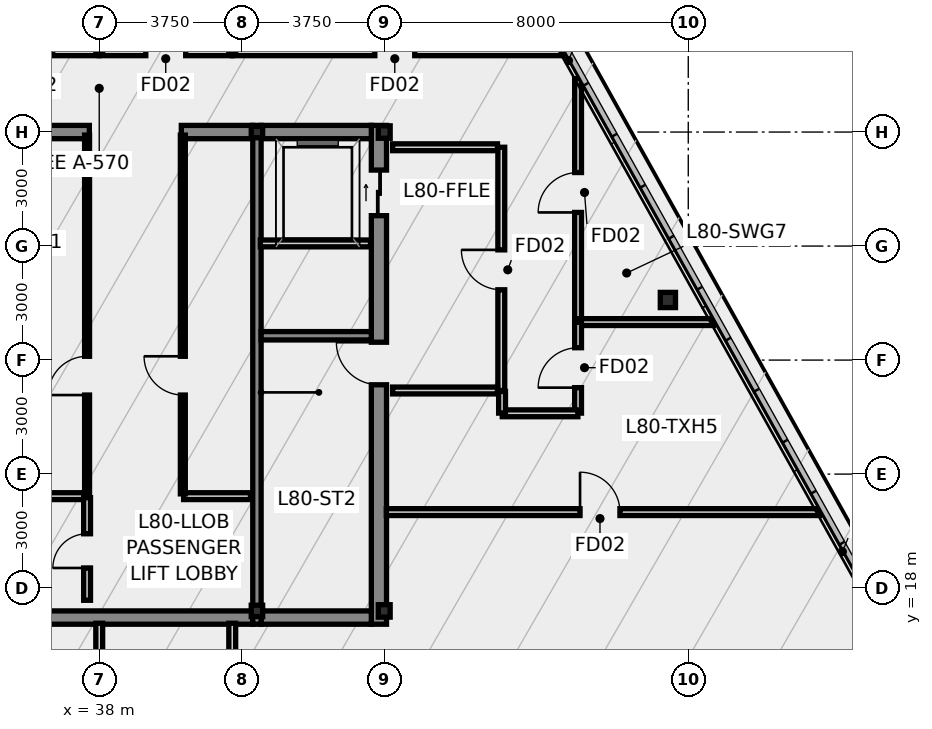
"""IFC4 building model, lengths in metres.
Left out: names, types, materials, properties, quantities, classifications, styles, units other than length and angle.
Written with IfcOpenShell. Run it as: python <this file> out.ifc"""

import sys

from ifc_helpers import new_model, si_unit, direction, frame, frame_2d, origin, origin_2d, place, context, subcontext, project, spatial, rectangle, hollow_rectangle, i_section, extrude, source, transform, mapped, element, fill, save


model = new_model("IFC4")
c1 = context("Model", 3, precision=1e-05, world=origin(), true_north=direction((0.0, 1.0)))
c2 = subcontext(c1, "Body", "Model", "MODEL_VIEW")
j1 = project(units=[si_unit("LENGTHUNIT", "METRE"), si_unit("PLANEANGLEUNIT", "RADIAN")], contexts=[c1])
p1 = place(None, origin())
s1 = spatial("IfcSite", under=j1, at=p1, CompositionType="ELEMENT")
p2 = place(p1, origin())
s2 = spatial("IfcBuilding", under=s1, at=p2, CompositionType="ELEMENT")
p3 = place(p2, frame((0.0, 0.0, 303.4)))
s3 = spatial("IfcBuildingStorey", under=s2, at=p3, CompositionType="ELEMENT", Elevation=303.4)
m1 = source(origin(), c2, "Body", "SweptSolid", [
    extrude(i_section(OverallWidth=0.311, OverallDepth=0.327, WebThickness=0.016, FlangeThickness=0.025, at=origin_2d()), origin(), (0.0, 0.0, 1.0), 8.567),
])
p4 = place(p3, frame((45.5, 17.4, 0.0), z_axis=(0.0, 0.0, 1.0), x_axis=(1.0, 0.0, 0.0)))
e1 = element("IfcColumn", 1, at=p4, inside=s3, PredefinedType="COLUMN", context=c2, shape_type="MappedRepresentation", body=[
    mapped(m1, transform((0.0, 0.0, 0.0), scale=1.0)),
])
m2 = source(origin(), c2, "Body", "SweptSolid", [
    extrude(i_section(OverallWidth=0.311, OverallDepth=0.327, WebThickness=0.016, FlangeThickness=0.025, at=origin_2d()), origin(), (0.0, 0.0, 1.0), 10.913),
])
p5 = place(p3, frame((45.5, 30.0, 0.0), z_axis=(0.0, 0.0, 1.0), x_axis=(1.0, 0.0, 0.0)))
e2 = element("IfcColumn", 2, at=p5, inside=s3, PredefinedType="COLUMN", context=c2, shape_type="MappedRepresentation", body=[
    mapped(m2, transform((0.0, 0.0, 0.0), scale=1.0)),
])
m3 = source(origin(), c2, "Body", "SweptSolid", [
    extrude(hollow_rectangle(XDim=0.3, YDim=0.3, WallThickness=0.012, at=origin_2d()), origin(), (0.0, 0.0, 1.0), 8.207),
])
p6 = place(p3, frame((42.15, 17.4, 0.0), z_axis=(0.0, 0.0, 1.0), x_axis=(1.0, 0.0, 0.0)))
e3 = element("IfcColumn", 3, at=p6, inside=s3, PredefinedType="COLUMN", context=c2, shape_type="MappedRepresentation", body=[
    mapped(m3, transform((0.0, 0.0, 0.0), scale=1.0)),
])
m4 = source(origin(), c2, "Body", "SweptSolid", [
    extrude(hollow_rectangle(XDim=0.3, YDim=0.3, WallThickness=0.012, at=origin_2d()), origin(), (0.0, 0.0, 1.0), 10.553),
])
p7 = place(p3, frame((42.15, 30.0, 0.0), z_axis=(0.0, 0.0, 1.0), x_axis=(1.0, 0.0, 0.0)))
e4 = element("IfcColumn", 4, at=p7, inside=s3, PredefinedType="COLUMN", context=c2, shape_type="MappedRepresentation", body=[
    mapped(m4, transform((0.0, 0.0, 0.0), scale=1.0)),
])
p8 = place(p3, frame((45.36, 17.05, 0.0), z_axis=(0.0, 0.0, 1.0), x_axis=(0.0, 1.0, 0.0)))
e5 = element("IfcWall", 5, at=p8, inside=s3, PredefinedType="SHEAR", context=c2, shape_type="SweptSolid", body=[
    extrude(rectangle(XDim=13.125, YDim=0.4, at=frame_2d((6.562, 0.0))), origin(), (0.0, 0.0, 1.0), 6.87),
])
p9 = place(p8, frame((6.3, 0.0, 0.0)))
e6 = element("IfcOpeningElement", 6, at=p9, cuts=e5, PredefinedType="OPENING", context=c2, shape_type="SweptSolid", body=[
    extrude(rectangle(XDim=1.12, YDim=2.15, at=frame_2d((0.56, 1.075))), frame((0.0, 0.212, 0.0), z_axis=(0.0, -1.0, 0.0), x_axis=(1.0, 0.0, 0.0)), (0.0, 0.0, 1.0), 0.424),
])
p10 = place(p8, frame((10.75, 0.0, 0.0)))
e7 = element("IfcOpeningElement", 7, at=p10, cuts=e5, PredefinedType="OPENING", context=c2, shape_type="SweptSolid", body=[
    extrude(rectangle(XDim=1.2, YDim=2.2, at=frame_2d((0.6, 1.1))), frame((0.0, 0.212, 0.0), z_axis=(0.0, -1.0, 0.0), x_axis=(1.0, 0.0, 0.0)), (0.0, 0.0, 1.0), 0.424),
])
p11 = place(p3, frame((33.96, 17.225, 0.0), z_axis=(0.0, 0.0, 1.0), x_axis=(1.0, 0.0, 0.0)))
e8 = element("IfcWall", 8, at=p11, inside=s3, PredefinedType="SHEAR", context=c2, shape_type="SweptSolid", body=[
    extrude(rectangle(XDim=8.08, YDim=0.35, at=frame_2d((4.04, 0.0))), origin(), (0.0, 0.0, 1.0), 6.87),
])
p12 = place(p3, frame((42.26, 17.225, 0.0), z_axis=(0.0, 0.0, 1.0), x_axis=(1.0, 0.0, 0.0)))
e9 = element("IfcWall", 9, at=p12, inside=s3, PredefinedType="SHEAR", context=c2, shape_type="SweptSolid", body=[
    extrude(rectangle(XDim=2.9, YDim=0.35, at=frame_2d((1.45, 0.0))), origin(), (0.0, 0.0, 1.0), 6.87),
])
p13 = place(p3, frame((33.96, 30.0, 0.0), z_axis=(0.0, 0.0, 1.0), x_axis=(1.0, 0.0, 0.0)))
e10 = element("IfcWall", 10, at=p13, inside=s3, PredefinedType="SHEAR", context=c2, shape_type="SweptSolid", body=[
    extrude(rectangle(XDim=3.78, YDim=0.35, at=frame_2d((1.89, 0.0))), origin(), (0.0, 0.0, 1.0), 6.87),
])
p14 = place(p3, frame((40.16, 30.0, 0.0), z_axis=(0.0, 0.0, 1.0), x_axis=(1.0, 0.0, 0.0)))
e11 = element("IfcWall", 11, at=p14, inside=s3, PredefinedType="SHEAR", context=c2, shape_type="SweptSolid", body=[
    extrude(rectangle(XDim=1.88, YDim=0.35, at=frame_2d((0.94, 0.0))), origin(), (0.0, 0.0, 1.0), 6.87),
])
p15 = place(p3, frame((42.26, 30.0, 0.0), z_axis=(0.0, 0.0, 1.0), x_axis=(1.0, 0.0, 0.0)))
e12 = element("IfcWall", 12, at=p15, inside=s3, PredefinedType="SHEAR", context=c2, shape_type="SweptSolid", body=[
    extrude(rectangle(XDim=2.9, YDim=0.35, at=frame_2d((1.45, 0.0))), origin(), (0.0, 0.0, 1.0), 6.87),
])
p16 = place(p3, frame((42.15, 17.05, 0.0), z_axis=(0.0, 0.0, 1.0), x_axis=(0.0, 1.0, 0.0)))
e13 = element("IfcWall", 13, at=p16, inside=s3, PredefinedType="SHEAR", context=c2, shape_type="SweptSolid", body=[
    extrude(rectangle(XDim=13.125, YDim=0.22, at=frame_2d((6.562, 0.0))), origin(), (0.0, 0.0, 1.0), 6.87),
])
p17 = place(p3, frame((42.26, 24.64, 0.0), z_axis=(0.0, 0.0, 1.0), x_axis=(1.0, 0.0, 0.0)))
e14 = element("IfcWall", 14, at=p17, inside=s3, PredefinedType="SHEAR", context=c2, shape_type="SweptSolid", body=[
    extrude(rectangle(XDim=2.9, YDim=0.22, at=frame_2d((1.45, 0.0))), origin(), (0.0, 0.0, 1.0), 6.87),
])
m5 = source(origin(), c2, "Body", "SweptSolid", [
    extrude(hollow_rectangle(XDim=0.4, YDim=0.4, WallThickness=0.016, at=origin_2d()), origin(), (0.0, 0.0, 1.0), 10.893),
])
p18 = place(p3, frame((52.964, 25.581, 0.0), z_axis=(0.0, 0.0, 1.0), x_axis=(1.0, 0.0, 0.0)))
e15 = element("IfcColumn", 15, at=p18, inside=s3, PredefinedType="COLUMN", context=c2, shape_type="MappedRepresentation", body=[
    mapped(m5, transform((0.0, 0.0, 0.0), scale=1.0)),
])
p19 = place(p3, frame((48.58, 23.2, 0.0), z_axis=(0.0, 0.0, 1.0), x_axis=(0.0, 1.0, 0.0)))
e16 = element("IfcWall", 16, at=p19, inside=s3, PredefinedType="PARTITIONING", context=c2, shape_type="SweptSolid", body=[
    extrude(rectangle(XDim=6.4, YDim=0.18, at=frame_2d((3.2, 0.0))), origin(), (0.0, 0.0, 1.0), 3.15),
])
p20 = place(p19, frame((2.65, 0.0, 0.0)))
e17 = element("IfcOpeningElement", 17, at=p20, cuts=e16, PredefinedType="OPENING", context=c2, shape_type="SweptSolid", body=[
    extrude(rectangle(XDim=1.05, YDim=2.15, at=frame_2d((0.525, 1.075))), frame((0.0, 0.102, 0.0), z_axis=(0.0, -1.0, 0.0), x_axis=(1.0, 0.0, 0.0)), (0.0, 0.0, 1.0), 0.204),
])
for number, where, z_axis, x_axis in (
    (18, (45.72, 23.2, 0.0), (0.0, 0.0, 1.0), (1.0, 0.0, 0.0)),
    (19, (45.72, 29.6, 0.0), (0.0, 0.0, 1.0), (1.0, 0.0, 0.0)),
):
    element("IfcWall", number, at=place(p3, frame(where, z_axis=z_axis, x_axis=x_axis)), inside=s3, PredefinedType="PARTITIONING", context=c2, shape_type="SweptSolid", body=[
        extrude(rectangle(XDim=2.76, YDim=0.18, at=frame_2d((1.38, 0.0))), origin(), (0.0, 0.0, 1.0), 3.15),
    ])
p21 = place(p3, frame((42.24, 27.07, 0.0), z_axis=(0.0, 0.0, 1.0), x_axis=(1.0, 0.0, 0.0)))
e20 = element("IfcWall", 20, at=p21, inside=s3, PredefinedType="PARTITIONING", context=c2, shape_type="SweptSolid", body=[
    extrude(rectangle(XDim=2.9, YDim=0.18, at=frame_2d((1.45, 0.0))), origin(), (0.0, 0.0, 1.0), 3.15),
])
p22 = place(p3, frame((34.02, 20.42, 0.0), z_axis=(0.0, 0.0, 1.0), x_axis=(1.0, 0.0, 0.0)))
e21 = element("IfcWall", 21, at=p22, inside=s3, PredefinedType="PARTITIONING", context=c2, shape_type="SweptSolid", body=[
    extrude(rectangle(XDim=3.64, YDim=0.18, at=frame_2d((1.82, 0.0))), origin(), (0.0, 0.0, 1.0), 3.15),
])
p23 = place(p3, frame((40.22, 20.42, 0.0), z_axis=(0.0, 0.0, 1.0), x_axis=(1.0, 0.0, 0.0)))
e22 = element("IfcWall", 22, at=p23, inside=s3, PredefinedType="PARTITIONING", context=c2, shape_type="SweptSolid", body=[
    extrude(rectangle(XDim=1.76, YDim=0.18, at=frame_2d((0.88, 0.0))), origin(), (0.0, 0.0, 1.0), 3.15),
])
p24 = place(p3, frame((37.68, 20.48, 0.0), z_axis=(0.0, 0.0, 1.0), x_axis=(0.0, 1.0, 0.0)))
e23 = element("IfcWall", 23, at=p24, inside=s3, PredefinedType="PARTITIONING", context=c2, shape_type="SweptSolid", body=[
    extrude(rectangle(XDim=9.44, YDim=0.13, at=frame_2d((4.72, 0.0))), origin(), (0.0, 0.0, 1.0), 3.15),
])
p25 = place(p24, frame((2.6, 0.0, 0.0)))
e24 = element("IfcOpeningElement", 24, at=p25, cuts=e23, PredefinedType="OPENING", context=c2, shape_type="SweptSolid", body=[
    extrude(rectangle(XDim=1.02, YDim=2.15, at=frame_2d((0.51, 1.075))), frame((0.0, 0.077, 0.0), z_axis=(0.0, -1.0, 0.0), x_axis=(1.0, 0.0, 0.0)), (0.0, 0.0, 1.0), 0.154),
])
p26 = place(p3, frame((40.2, 20.48, 0.0), z_axis=(0.0, 0.0, 1.0), x_axis=(0.0, 1.0, 0.0)))
e25 = element("IfcWall", 25, at=p26, inside=s3, PredefinedType="PARTITIONING", context=c2, shape_type="SweptSolid", body=[
    extrude(rectangle(XDim=9.44, YDim=0.13, at=frame_2d((4.72, 0.0))), origin(), (0.0, 0.0, 1.0), 3.15),
])
p27 = place(p26, frame((2.6, 0.0, 0.0)))
e26 = element("IfcOpeningElement", 26, at=p27, cuts=e25, PredefinedType="OPENING", context=c2, shape_type="SweptSolid", body=[
    extrude(rectangle(XDim=1.02, YDim=2.15, at=frame_2d((0.51, 1.075))), frame((0.0, 0.077, 0.0), z_axis=(0.0, -1.0, 0.0), x_axis=(1.0, 0.0, 0.0)), (0.0, 0.0, 1.0), 0.154),
])
p28 = place(p3, frame((37.68, 17.68, 0.0), z_axis=(0.0, 0.0, 1.0), x_axis=(0.0, 1.0, 0.0)))
e27 = element("IfcWall", 27, at=p28, inside=s3, PredefinedType="PARTITIONING", context=c2, shape_type="SweptSolid", body=[
    extrude(rectangle(XDim=2.7, YDim=0.18, at=frame_2d((1.35, 0.0))), origin(), (0.0, 0.0, 1.0), 3.15),
])
p29 = place(p28, frame((0.85, 0.0, 0.0)))
e28 = element("IfcOpeningElement", 28, at=p29, cuts=e27, PredefinedType="OPENING", context=c2, shape_type="SweptSolid", body=[
    extrude(rectangle(XDim=0.9, YDim=2.1, at=frame_2d((0.45, 1.05))), frame((0.0, 0.102, 0.0), z_axis=(0.0, -1.0, 0.0), x_axis=(1.0, 0.0, 0.0)), (0.0, 0.0, 1.0), 0.204),
])
p30 = place(p3, frame((45.555, 20.0, 0.0), z_axis=(0.0, 0.0, 1.0), x_axis=(1.0, 0.0, 0.0)))
e29 = element("IfcWall", 29, at=p30, inside=s3, PredefinedType="PARTITIONING", context=c2, shape_type="SweptSolid", body=[
    extrude(rectangle(XDim=11.401, YDim=0.18, at=frame_2d((5.7, 0.0))), origin(), (0.0, 0.0, 1.0), 3.15),
])
p31 = place(p30, frame((5.097, 0.0, 0.0)))
e30 = element("IfcOpeningElement", 30, at=p31, cuts=e29, PredefinedType="OPENING", context=c2, shape_type="SweptSolid", body=[
    extrude(rectangle(XDim=1.05, YDim=2.15, at=frame_2d((0.525, 1.075))), frame((0.0, 0.102, 0.0), z_axis=(0.0, -1.0, 0.0), x_axis=(1.0, 0.0, 0.0)), (0.0, 0.0, 1.0), 0.204),
])
p32 = place(p3, frame((41.505, 32.1, 0.0), z_axis=(0.0, 0.0, 1.0), x_axis=(1.0, 0.0, 0.0)))
e31 = element("IfcWall", 31, at=p32, inside=s3, PredefinedType="PARTITIONING", context=c2, shape_type="SweptSolid", body=[
    extrude(rectangle(XDim=8.699, YDim=0.18, at=frame_2d((4.35, 0.0))), origin(), (0.0, 0.0, 1.0), 3.15),
])
p33 = place(p32, frame((3.747, 0.0, 0.0)))
e32 = element("IfcOpeningElement", 32, at=p33, cuts=e31, PredefinedType="OPENING", context=c2, shape_type="SweptSolid", body=[
    extrude(rectangle(XDim=1.05, YDim=2.15, at=frame_2d((0.525, 1.075))), frame((0.0, 0.102, 0.0), z_axis=(0.0, -1.0, 0.0), x_axis=(1.0, 0.0, 0.0)), (0.0, 0.0, 1.0), 0.204),
])
p34 = place(p3, frame((41.5, 9.227, 0.0), z_axis=(0.0, 0.0, 1.0), x_axis=(0.0, 1.0, 0.0)))
e33 = element("IfcWall", 33, at=p34, inside=s3, PredefinedType="PARTITIONING", context=c2, shape_type="SweptSolid", body=[
    extrude(rectangle(XDim=7.848, YDim=0.18, at=frame_2d((3.924, 0.0))), origin(), (0.0, 0.0, 1.0), 3.15),
])
p35 = place(p34, frame((3.333, 0.0, 0.0)))
e34 = element("IfcOpeningElement", 34, at=p35, cuts=e33, PredefinedType="OPENING", context=c2, shape_type="SweptSolid", body=[
    extrude(rectangle(XDim=1.05, YDim=2.15, at=frame_2d((0.525, 1.075))), frame((0.0, 0.102, 0.0), z_axis=(0.0, -1.0, 0.0), x_axis=(1.0, 0.0, 0.0)), (0.0, 0.0, 1.0), 0.204),
])
p36 = place(p3, frame((38.0, 10.72, 0.0), z_axis=(0.0, 0.0, 1.0), x_axis=(0.0, 1.0, 0.0)))
e35 = element("IfcWall", 35, at=p36, inside=s3, PredefinedType="PARTITIONING", context=c2, shape_type="SweptSolid", body=[
    extrude(rectangle(XDim=6.355, YDim=0.18, at=frame_2d((3.177, 0.0))), origin(), (0.0, 0.0, 1.0), 3.15),
])
p37 = place(p3, frame((50.6, 25.005, 0.0), z_axis=(0.0, 0.0, 1.0), x_axis=(0.0, 1.0, 0.0)))
e36 = element("IfcWall", 36, at=p37, inside=s3, PredefinedType="PARTITIONING", context=c2, shape_type="SweptSolid", body=[
    extrude(rectangle(XDim=6.402, YDim=0.18, at=frame_2d((3.201, 0.0))), origin(), (0.0, 0.0, 1.0), 3.15),
])
p38 = place(p37, frame((2.88, 0.0, 0.0)))
e37 = element("IfcOpeningElement", 37, at=p38, cuts=e36, PredefinedType="OPENING", context=c2, shape_type="SweptSolid", body=[
    extrude(rectangle(XDim=1.05, YDim=2.15, at=frame_2d((0.525, 1.075))), frame((0.0, 0.102, 0.0), z_axis=(0.0, -1.0, 0.0), x_axis=(1.0, 0.0, 0.0)), (0.0, 0.0, 1.0), 0.204),
])
p39 = place(p3, frame((34.505, 32.1, 0.0), z_axis=(0.0, 0.0, 1.0), x_axis=(1.0, 0.0, 0.0)))
e38 = element("IfcWall", 38, at=p39, inside=s3, PredefinedType="PARTITIONING", context=c2, shape_type="SweptSolid", body=[
    extrude(rectangle(XDim=3.49, YDim=0.18, at=frame_2d((1.745, 0.0))), origin(), (0.0, 0.0, 1.0), 3.15),
])
p40 = place(p39, frame((1.22, 0.0, 0.0)))
e39 = element("IfcOpeningElement", 39, at=p40, cuts=e38, PredefinedType="OPENING", context=c2, shape_type="SweptSolid", body=[
    extrude(rectangle(XDim=1.05, YDim=2.15, at=frame_2d((0.525, 1.075))), frame((0.0, 0.102, 0.0), z_axis=(0.0, -1.0, 0.0), x_axis=(1.0, 0.0, 0.0)), (0.0, 0.0, 1.0), 0.204),
])
p41 = place(p3, frame((38.005, 32.1, 0.0), z_axis=(0.0, 0.0, 1.0), x_axis=(1.0, 0.0, 0.0)))
e40 = element("IfcWall", 40, at=p41, inside=s3, PredefinedType="PARTITIONING", context=c2, shape_type="SweptSolid", body=[
    extrude(rectangle(XDim=3.49, YDim=0.18, at=frame_2d((1.745, 0.0))), origin(), (0.0, 0.0, 1.0), 3.15),
])
p42 = place(p41, frame((1.22, 0.0, 0.0)))
e41 = element("IfcOpeningElement", 41, at=p42, cuts=e40, PredefinedType="OPENING", context=c2, shape_type="SweptSolid", body=[
    extrude(rectangle(XDim=1.05, YDim=2.15, at=frame_2d((0.525, 1.075))), frame((0.0, 0.102, 0.0), z_axis=(0.0, -1.0, 0.0), x_axis=(1.0, 0.0, 0.0)), (0.0, 0.0, 1.0), 0.204),
])
p43 = place(p3, frame((50.605, 25.0, 0.0), z_axis=(0.0, 0.0, 1.0), x_axis=(1.0, 0.0, 0.0)))
e42 = element("IfcWall", 42, at=p43, inside=s3, PredefinedType="PARTITIONING", context=c2, shape_type="SweptSolid", body=[
    extrude(rectangle(XDim=3.561, YDim=0.18, at=frame_2d((1.781, 0.0))), origin(), (0.0, 0.0, 1.0), 3.15),
])
p44 = place(p3, frame((50.6, 22.605, 0.0), z_axis=(0.0, 0.0, 1.0), x_axis=(0.0, 1.0, 0.0)))
e43 = element("IfcWall", 43, at=p44, inside=s3, PredefinedType="PARTITIONING", context=c2, shape_type="SweptSolid", body=[
    extrude(rectangle(XDim=2.39, YDim=0.18, at=frame_2d((1.195, 0.0))), origin(), (0.0, 0.0, 1.0), 3.15),
])
p45 = place(p44, frame((0.67, 0.0, 0.0)))
e44 = element("IfcOpeningElement", 44, at=p45, cuts=e43, PredefinedType="OPENING", context=c2, shape_type="SweptSolid", body=[
    extrude(rectangle(XDim=1.05, YDim=2.15, at=frame_2d((0.525, 1.075))), frame((0.0, 0.102, 0.0), z_axis=(0.0, -1.0, 0.0), x_axis=(1.0, 0.0, 0.0)), (0.0, 0.0, 1.0), 0.204),
])
p46 = place(p3, frame((48.605, 22.6, 0.0), z_axis=(0.0, 0.0, 1.0), x_axis=(1.0, 0.0, 0.0)))
e45 = element("IfcWall", 45, at=p46, inside=s3, PredefinedType="PARTITIONING", context=c2, shape_type="SweptSolid", body=[
    extrude(rectangle(XDim=1.99, YDim=0.18, at=frame_2d((0.995, 0.0))), origin(), (0.0, 0.0, 1.0), 3.15),
])
p47 = place(p3, frame((48.6, 23.175, 0.0), z_axis=(0.0, 0.0, 1.0), x_axis=(0.0, -1.0, 0.0)))
e46 = element("IfcWall", 46, at=p47, inside=s3, PredefinedType="PARTITIONING", context=c2, shape_type="SweptSolid", body=[
    extrude(rectangle(XDim=0.57, YDim=0.18, at=frame_2d((0.285, 0.0))), origin(), (0.0, 0.0, 1.0), 3.15),
])
p48 = place(p9, origin())
e47 = element("IfcDoor", 47, at=p48, inside=s3, OperationType="SINGLE_SWING_RIGHT", PredefinedType="DOOR", context=c2, shape_type="SweptSolid", body=[
    extrude(rectangle(XDim=1.12, YDim=2.15, at=frame_2d((0.56, 1.075))), frame((0.0, 0.025, 0.0), z_axis=(0.0, -1.0, 0.0), x_axis=(1.0, 0.0, 0.0)), (0.0, 0.0, 1.0), 0.05),
])
fill(e6, e47)
p49 = place(p10, origin())
e48 = element("IfcDoor", 48, at=p49, inside=s3, OperationType="SLIDING_TO_RIGHT", PredefinedType="DOOR", context=c2, shape_type="SweptSolid", body=[
    extrude(rectangle(XDim=1.2, YDim=2.2, at=frame_2d((0.6, 1.1))), frame((0.0, 0.025, 0.0), z_axis=(0.0, -1.0, 0.0), x_axis=(1.0, 0.0, 0.0)), (0.0, 0.0, 1.0), 0.05),
])
fill(e7, e48)
p50 = place(p20, origin())
e49 = element("IfcDoor", 49, at=p50, inside=s3, OperationType="SINGLE_SWING_RIGHT", PredefinedType="DOOR", context=c2, shape_type="SweptSolid", body=[
    extrude(rectangle(XDim=1.05, YDim=2.15, at=frame_2d((0.525, 1.075))), frame((0.0, 0.025, 0.0), z_axis=(0.0, -1.0, 0.0), x_axis=(1.0, 0.0, 0.0)), (0.0, 0.0, 1.0), 0.05),
])
fill(e17, e49)
p51 = place(p25, origin())
e50 = element("IfcDoor", 50, at=p51, inside=s3, OperationType="SINGLE_SWING_LEFT", PredefinedType="DOOR", context=c2, shape_type="SweptSolid", body=[
    extrude(rectangle(XDim=1.02, YDim=2.15, at=frame_2d((0.51, 1.075))), frame((0.0, 0.025, 0.0), z_axis=(0.0, -1.0, 0.0), x_axis=(1.0, 0.0, 0.0)), (0.0, 0.0, 1.0), 0.05),
])
fill(e24, e50)
p52 = place(p27, origin())
e51 = element("IfcDoor", 51, at=p52, inside=s3, OperationType="SINGLE_SWING_RIGHT", PredefinedType="DOOR", context=c2, shape_type="SweptSolid", body=[
    extrude(rectangle(XDim=1.02, YDim=2.15, at=frame_2d((0.51, 1.075))), frame((0.0, 0.025, 0.0), z_axis=(0.0, -1.0, 0.0), x_axis=(1.0, 0.0, 0.0)), (0.0, 0.0, 1.0), 0.05),
])
fill(e26, e51)
p53 = place(p29, origin())
e52 = element("IfcDoor", 52, at=p53, inside=s3, OperationType="SINGLE_SWING_LEFT", PredefinedType="DOOR", context=c2, shape_type="SweptSolid", body=[
    extrude(rectangle(XDim=0.9, YDim=2.1, at=frame_2d((0.45, 1.05))), frame((0.0, 0.025, 0.0), z_axis=(0.0, -1.0, 0.0), x_axis=(1.0, 0.0, 0.0)), (0.0, 0.0, 1.0), 0.05),
])
fill(e28, e52)
p54 = place(p31, origin())
e53 = element("IfcDoor", 53, at=p54, inside=s3, OperationType="SINGLE_SWING_LEFT", PredefinedType="DOOR", context=c2, shape_type="SweptSolid", body=[
    extrude(rectangle(XDim=1.05, YDim=2.15, at=frame_2d((0.525, 1.075))), frame((0.0, 0.025, 0.0), z_axis=(0.0, -1.0, 0.0), x_axis=(1.0, 0.0, 0.0)), (0.0, 0.0, 1.0), 0.05),
])
fill(e30, e53)
p55 = place(p33, origin())
e54 = element("IfcDoor", 54, at=p55, inside=s3, OperationType="SINGLE_SWING_RIGHT", PredefinedType="DOOR", context=c2, shape_type="SweptSolid", body=[
    extrude(rectangle(XDim=1.05, YDim=2.15, at=frame_2d((0.525, 1.075))), frame((0.0, 0.025, 0.0), z_axis=(0.0, -1.0, 0.0), x_axis=(1.0, 0.0, 0.0)), (0.0, 0.0, 1.0), 0.05),
])
fill(e32, e54)
p56 = place(p38, origin())
e55 = element("IfcDoor", 55, at=p56, inside=s3, OperationType="SINGLE_SWING_LEFT", PredefinedType="DOOR", context=c2, shape_type="SweptSolid", body=[
    extrude(rectangle(XDim=1.05, YDim=2.15, at=frame_2d((0.525, 1.075))), frame((0.0, 0.025, 0.0), z_axis=(0.0, -1.0, 0.0), x_axis=(1.0, 0.0, 0.0)), (0.0, 0.0, 1.0), 0.05),
])
fill(e37, e55)
p57 = place(p40, origin())
e56 = element("IfcDoor", 56, at=p57, inside=s3, OperationType="SINGLE_SWING_LEFT", PredefinedType="DOOR", context=c2, shape_type="SweptSolid", body=[
    extrude(rectangle(XDim=1.05, YDim=2.15, at=frame_2d((0.525, 1.075))), frame((0.0, 0.025, 0.0), z_axis=(0.0, -1.0, 0.0), x_axis=(1.0, 0.0, 0.0)), (0.0, 0.0, 1.0), 0.05),
])
fill(e39, e56)
p58 = place(p42, origin())
e57 = element("IfcDoor", 57, at=p58, inside=s3, OperationType="SINGLE_SWING_RIGHT", PredefinedType="DOOR", context=c2, shape_type="SweptSolid", body=[
    extrude(rectangle(XDim=1.05, YDim=2.15, at=frame_2d((0.525, 1.075))), frame((0.0, 0.025, 0.0), z_axis=(0.0, -1.0, 0.0), x_axis=(1.0, 0.0, 0.0)), (0.0, 0.0, 1.0), 0.05),
])
fill(e41, e57)
p59 = place(p45, origin())
e58 = element("IfcDoor", 58, at=p59, inside=s3, OperationType="SINGLE_SWING_LEFT", PredefinedType="DOOR", context=c2, shape_type="SweptSolid", body=[
    extrude(rectangle(XDim=1.05, YDim=2.15, at=frame_2d((0.525, 1.075))), frame((0.0, 0.025, 0.0), z_axis=(0.0, -1.0, 0.0), x_axis=(1.0, 0.0, 0.0)), (0.0, 0.0, 1.0), 0.05),
])
fill(e44, e58)
save(model, sys.argv[1])
